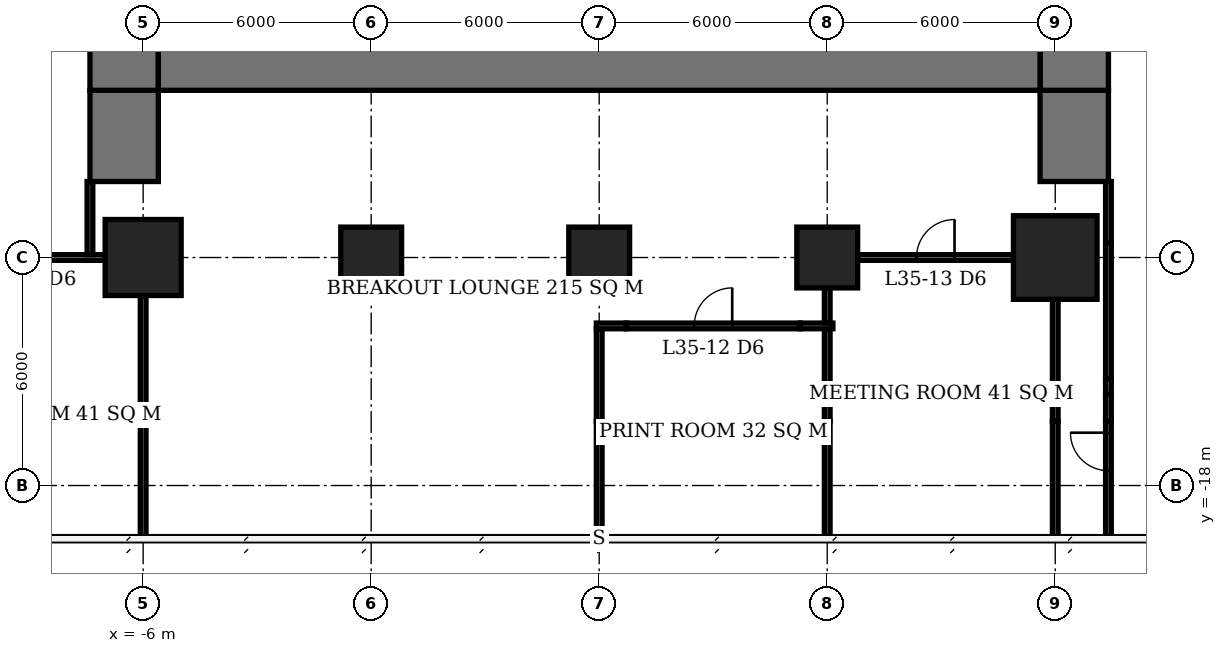
"""IFC4 building model, lengths in metres.
Left out: names, types, materials, properties, quantities, classifications, styles, units other than length and angle.
Written with IfcOpenShell. Run it as: python <this file> out.ifc"""

import sys

from ifc_helpers import new_model, si_unit, direction, frame, frame_2d, origin, origin_2d, place, context, subcontext, project, spatial, rectangle, extrude, element, fill, save


model = new_model("IFC4")
c1 = context("Model", 3, precision=1e-05, world=origin(), true_north=direction((0.0, 1.0)))
c2 = subcontext(c1, "Body", "Model", "MODEL_VIEW")
j1 = project(units=[si_unit("LENGTHUNIT", "METRE"), si_unit("PLANEANGLEUNIT", "RADIAN")], contexts=[c1])
p1 = place(None, origin())
s1 = spatial("IfcSite", under=j1, at=p1, CompositionType="ELEMENT")
p2 = place(p1, origin())
s2 = spatial("IfcBuilding", under=s1, at=p2, CompositionType="ELEMENT")
p3 = place(p2, frame((0.0, 0.0, 144.5)))
s3 = spatial("IfcBuildingStorey", under=s2, at=p3, CompositionType="ELEMENT", Elevation=144.5)
p4 = place(p3, frame((-6.0, -12.0, 0.0), z_axis=(0.0, 0.0, 1.0), x_axis=(1.0, 0.0, 0.0)))
e1 = element("IfcColumn", 1, at=p4, inside=s3, PredefinedType="COLUMN", context=c2, shape_type="SweptSolid", body=[
    extrude(rectangle(XDim=2.0, YDim=2.0, at=origin_2d()), origin(), (0.0, 0.0, 1.0), 3.9),
])
for number, where, z_axis, x_axis in (
    (2, (0.0, -12.0, 0.0), (0.0, 0.0, 1.0), (1.0, 0.0, 0.0)),
    (3, (6.0, -12.0, 0.0), (0.0, 0.0, 1.0), (1.0, 0.0, 0.0)),
    (4, (12.0, -12.0, 0.0), (0.0, 0.0, 1.0), (1.0, 0.0, 0.0)),
):
    element("IfcColumn", number, at=place(p3, frame(where, z_axis=z_axis, x_axis=x_axis)), inside=s3, PredefinedType="COLUMN", context=c2, shape_type="SweptSolid", body=[
        extrude(rectangle(XDim=1.6, YDim=1.6, at=origin_2d()), origin(), (0.0, 0.0, 1.0), 3.9),
    ])
p5 = place(p3, frame((18.0, -12.0, 0.0), z_axis=(0.0, 0.0, 1.0), x_axis=(1.0, 0.0, 0.0)))
e5 = element("IfcColumn", 5, at=p5, inside=s3, PredefinedType="COLUMN", context=c2, shape_type="SweptSolid", body=[
    extrude(rectangle(XDim=2.2, YDim=2.2, at=origin_2d()), origin(), (0.0, 0.0, 1.0), 3.9),
])
p6 = place(p3, frame((-5.6, -6.6, 0.0), z_axis=(0.0, 0.0, 1.0), x_axis=(1.0, 0.0, 0.0)))
e6 = element("IfcWall", 6, at=p6, inside=s3, PredefinedType="SHEAR", context=c2, shape_type="SweptSolid", body=[
    extrude(rectangle(XDim=23.2, YDim=2.0, at=frame_2d((11.6, 0.0))), origin(), (0.0, 0.0, 1.0), 3.9),
])
p7 = place(p3, frame((-6.5, -7.6, 0.0), z_axis=(0.0, 0.0, 1.0), x_axis=(0.0, 1.0, 0.0)))
e7 = element("IfcWall", 7, at=p7, inside=s3, PredefinedType="SHEAR", context=c2, shape_type="SweptSolid", body=[
    extrude(rectangle(XDim=21.2, YDim=1.8, at=frame_2d((10.6, 0.0))), origin(), (0.0, 0.0, 1.0), 3.9),
])
p8 = place(p7, frame((7.8, 0.0, 0.0)))
e8 = element("IfcOpeningElement", 8, at=p8, cuts=e7, PredefinedType="OPENING", context=c2, shape_type="SweptSolid", body=[
    extrude(rectangle(XDim=1.8, YDim=2.4, at=frame_2d((0.9, 1.2))), frame((0.0, 0.91, 0.0), z_axis=(0.0, -1.0, 0.0), x_axis=(1.0, 0.0, 0.0)), (0.0, 0.0, 1.0), 1.82),
])
p9 = place(p3, frame((18.5, -7.6, 0.0), z_axis=(0.0, 0.0, 1.0), x_axis=(0.0, 1.0, 0.0)))
e9 = element("IfcWall", 9, at=p9, inside=s3, PredefinedType="SHEAR", context=c2, shape_type="SweptSolid", body=[
    extrude(rectangle(XDim=21.2, YDim=1.8, at=frame_2d((10.6, 0.0))), origin(), (0.0, 0.0, 1.0), 3.9),
])
p10 = place(p9, frame((9.2, 0.0, 0.0)))
e10 = element("IfcOpeningElement", 10, at=p10, cuts=e9, PredefinedType="OPENING", context=c2, shape_type="SweptSolid", body=[
    extrude(rectangle(XDim=1.8, YDim=2.4, at=frame_2d((0.9, 1.2))), frame((0.0, 0.91, 0.0), z_axis=(0.0, -1.0, 0.0), x_axis=(1.0, 0.0, 0.0)), (0.0, 0.0, 1.0), 1.82),
])
for number, where, z_axis, x_axis in (
    (11, (-6.5, -10.0, 0.0), (0.0, 0.0, 1.0), (0.0, 1.0, 0.0)),
    (12, (18.5, -10.0, 0.0), (0.0, 0.0, 1.0), (0.0, 1.0, 0.0)),
):
    element("IfcWall", number, at=place(p3, frame(where, z_axis=z_axis, x_axis=x_axis)), inside=s3, PredefinedType="SHEAR", context=c2, shape_type="SweptSolid", body=[
        extrude(rectangle(XDim=2.4, YDim=1.8, at=frame_2d((1.2, 0.0))), origin(), (0.0, 0.0, 1.0), 3.9),
    ])
p11 = place(p3, frame((5.925, -13.8, 0.0), z_axis=(0.0, 0.0, 1.0), x_axis=(1.0, 0.0, 0.0)))
e13 = element("IfcWall", 13, at=p11, inside=s3, PredefinedType="PARTITIONING", context=c2, shape_type="SweptSolid", body=[
    extrude(rectangle(XDim=0.785, YDim=0.15, at=frame_2d((0.393, 0.0))), origin(), (0.0, 0.0, 1.0), 2.65),
])
p12 = place(p3, frame((6.71, -13.8, 0.0), z_axis=(0.0, 0.0, 1.0), x_axis=(1.0, 0.0, 0.0)))
e14 = element("IfcWall", 14, at=p12, inside=s3, PredefinedType="PARTITIONING", context=c2, shape_type="SweptSolid", body=[
    extrude(rectangle(XDim=4.58, YDim=0.15, at=frame_2d((2.29, 0.0))), origin(), (0.0, 0.0, 1.0), 3.65),
])
p13 = place(p12, frame((1.79, 0.0, 0.0)))
e15 = element("IfcOpeningElement", 15, at=p13, cuts=e14, PredefinedType="OPENING", context=c2, shape_type="SweptSolid", body=[
    extrude(rectangle(XDim=1.0, YDim=2.1, at=frame_2d((0.5, 1.05))), frame((0.0, 0.085, 0.0), z_axis=(0.0, -1.0, 0.0), x_axis=(1.0, 0.0, 0.0)), (0.0, 0.0, 1.0), 0.17),
])
p14 = place(p3, frame((11.29, -13.8, 0.0), z_axis=(0.0, 0.0, 1.0), x_axis=(1.0, 0.0, 0.0)))
e16 = element("IfcWall", 16, at=p14, inside=s3, PredefinedType="PARTITIONING", context=c2, shape_type="SweptSolid", body=[
    extrude(rectangle(XDim=0.86, YDim=0.15, at=frame_2d((0.43, 0.0))), origin(), (0.0, 0.0, 1.0), 2.65),
])
p15 = place(p3, frame((-11.2, -12.0, 0.0), z_axis=(0.0, 0.0, 1.0), x_axis=(1.0, 0.0, 0.0)))
e17 = element("IfcWall", 17, at=p15, inside=s3, PredefinedType="PARTITIONING", context=c2, shape_type="SweptSolid", body=[
    extrude(rectangle(XDim=4.2, YDim=0.15, at=frame_2d((2.1, 0.0))), origin(), (0.0, 0.0, 1.0), 3.65),
])
p16 = place(p15, frame((1.6, 0.0, 0.0)))
e18 = element("IfcOpeningElement", 18, at=p16, cuts=e17, PredefinedType="OPENING", context=c2, shape_type="SweptSolid", body=[
    extrude(rectangle(XDim=1.0, YDim=2.1, at=frame_2d((0.5, 1.05))), frame((0.0, 0.085, 0.0), z_axis=(0.0, -1.0, 0.0), x_axis=(1.0, 0.0, 0.0)), (0.0, 0.0, 1.0), 0.17),
])
p17 = place(p3, frame((12.8, -12.0, 0.0), z_axis=(0.0, 0.0, 1.0), x_axis=(1.0, 0.0, 0.0)))
e19 = element("IfcWall", 19, at=p17, inside=s3, PredefinedType="PARTITIONING", context=c2, shape_type="SweptSolid", body=[
    extrude(rectangle(XDim=4.1, YDim=0.15, at=frame_2d((2.05, 0.0))), origin(), (0.0, 0.0, 1.0), 3.65),
])
p18 = place(p17, frame((1.55, 0.0, 0.0)))
e20 = element("IfcOpeningElement", 20, at=p18, cuts=e19, PredefinedType="OPENING", context=c2, shape_type="SweptSolid", body=[
    extrude(rectangle(XDim=1.0, YDim=2.1, at=frame_2d((0.5, 1.05))), frame((0.0, 0.085, 0.0), z_axis=(0.0, -1.0, 0.0), x_axis=(1.0, 0.0, 0.0)), (0.0, 0.0, 1.0), 0.17),
])
p19 = place(p3, frame((-6.0, -19.4, 0.0), z_axis=(0.0, 0.0, 1.0), x_axis=(0.0, 1.0, 0.0)))
e21 = element("IfcWall", 21, at=p19, inside=s3, PredefinedType="PARTITIONING", context=c2, shape_type="SweptSolid", body=[
    extrude(rectangle(XDim=3.09, YDim=0.15, at=frame_2d((1.545, 0.0))), origin(), (0.0, 0.0, 1.0), 3.65),
])
p20 = place(p3, frame((-6.0, -16.31, 0.0), z_axis=(0.0, 0.0, 1.0), x_axis=(0.0, 1.0, 0.0)))
e22 = element("IfcWall", 22, at=p20, inside=s3, PredefinedType="PARTITIONING", context=c2, shape_type="SweptSolid", body=[
    extrude(rectangle(XDim=3.31, YDim=0.15, at=frame_2d((1.655, 0.0))), origin(), (0.0, 0.0, 1.0), 2.65),
])
p21 = place(p3, frame((6.0, -19.35, 0.0), z_axis=(0.0, 0.0, 1.0), x_axis=(0.0, 1.0, 0.0)))
e23 = element("IfcWall", 23, at=p21, inside=s3, PredefinedType="PARTITIONING", context=c2, shape_type="SweptSolid", body=[
    extrude(rectangle(XDim=3.04, YDim=0.15, at=frame_2d((1.52, 0.0))), origin(), (0.0, 0.0, 1.0), 3.65),
])
p22 = place(p3, frame((6.0, -16.31, 0.0), z_axis=(0.0, 0.0, 1.0), x_axis=(0.0, 1.0, 0.0)))
e24 = element("IfcWall", 24, at=p22, inside=s3, PredefinedType="PARTITIONING", context=c2, shape_type="SweptSolid", body=[
    extrude(rectangle(XDim=2.435, YDim=0.15, at=frame_2d((1.218, 0.0))), origin(), (0.0, 0.0, 1.0), 2.65),
])
p23 = place(p3, frame((12.0, -19.4, 0.0), z_axis=(0.0, 0.0, 1.0), x_axis=(0.0, 1.0, 0.0)))
e25 = element("IfcWall", 25, at=p23, inside=s3, PredefinedType="PARTITIONING", context=c2, shape_type="SweptSolid", body=[
    extrude(rectangle(XDim=3.09, YDim=0.15, at=frame_2d((1.545, 0.0))), origin(), (0.0, 0.0, 1.0), 3.65),
])
p24 = place(p3, frame((12.0, -16.31, 0.0), z_axis=(0.0, 0.0, 1.0), x_axis=(0.0, 1.0, 0.0)))
e26 = element("IfcWall", 26, at=p24, inside=s3, PredefinedType="PARTITIONING", context=c2, shape_type="SweptSolid", body=[
    extrude(rectangle(XDim=2.435, YDim=0.15, at=frame_2d((1.218, 0.0))), origin(), (0.0, 0.0, 1.0), 2.65),
])
p25 = place(p3, frame((12.0, -13.725, 0.0), z_axis=(0.0, 0.0, 1.0), x_axis=(0.0, 1.0, 0.0)))
e27 = element("IfcWall", 27, at=p25, inside=s3, PredefinedType="PARTITIONING", context=c2, shape_type="SweptSolid", body=[
    extrude(rectangle(XDim=0.925, YDim=0.15, at=frame_2d((0.462, 0.0))), origin(), (0.0, 0.0, 1.0), 2.65),
])
p26 = place(p3, frame((18.0, -19.4, 0.0), z_axis=(0.0, 0.0, 1.0), x_axis=(0.0, 1.0, 0.0)))
e28 = element("IfcWall", 28, at=p26, inside=s3, PredefinedType="PARTITIONING", context=c2, shape_type="SweptSolid", body=[
    extrude(rectangle(XDim=3.09, YDim=0.15, at=frame_2d((1.545, 0.0))), origin(), (0.0, 0.0, 1.0), 3.65),
])
p27 = place(p3, frame((18.0, -16.31, 0.0), z_axis=(0.0, 0.0, 1.0), x_axis=(0.0, 1.0, 0.0)))
e29 = element("IfcWall", 29, at=p27, inside=s3, PredefinedType="PARTITIONING", context=c2, shape_type="SweptSolid", body=[
    extrude(rectangle(XDim=3.21, YDim=0.15, at=frame_2d((1.605, 0.0))), origin(), (0.0, 0.0, 1.0), 2.65),
])
p28 = place(p3, frame((-7.4, -11.925, 0.0), z_axis=(0.0, 0.0, 1.0), x_axis=(0.0, 1.0, 0.0)))
e30 = element("IfcWall", 30, at=p28, inside=s3, PredefinedType="PARTITIONING", context=c2, shape_type="SweptSolid", body=[
    extrude(rectangle(XDim=1.925, YDim=0.15, at=frame_2d((0.962, 0.0))), origin(), (0.0, 0.0, 1.0), 3.65),
])
p29 = place(p3, frame((19.4, -19.4, 0.0), z_axis=(0.0, 0.0, 1.0), x_axis=(0.0, 1.0, 0.0)))
e31 = element("IfcWall", 31, at=p29, inside=s3, PredefinedType="PARTITIONING", context=c2, shape_type="SweptSolid", body=[
    extrude(rectangle(XDim=3.09, YDim=0.15, at=frame_2d((1.545, 0.0))), origin(), (0.0, 0.0, 1.0), 3.65),
])
p30 = place(p29, frame((1.79, 0.0, 0.0)))
e32 = element("IfcOpeningElement", 32, at=p30, cuts=e31, PredefinedType="OPENING", context=c2, shape_type="SweptSolid", body=[
    extrude(rectangle(XDim=1.0, YDim=2.1, at=frame_2d((0.5, 1.05))), frame((0.0, 0.085, 0.0), z_axis=(0.0, -1.0, 0.0), x_axis=(1.0, 0.0, 0.0)), (0.0, 0.0, 1.0), 0.17),
])
p31 = place(p3, frame((19.4, -16.31, 0.0), z_axis=(0.0, 0.0, 1.0), x_axis=(0.0, 1.0, 0.0)))
e33 = element("IfcWall", 33, at=p31, inside=s3, PredefinedType="PARTITIONING", context=c2, shape_type="SweptSolid", body=[
    extrude(rectangle(XDim=0.72, YDim=0.15, at=frame_2d((0.36, 0.0))), origin(), (0.0, 0.0, 1.0), 2.65),
])
p32 = place(p3, frame((19.4, -15.59, 0.0), z_axis=(0.0, 0.0, 1.0), x_axis=(0.0, 1.0, 0.0)))
e34 = element("IfcWall", 34, at=p32, inside=s3, PredefinedType="PARTITIONING", context=c2, shape_type="SweptSolid", body=[
    extrude(rectangle(XDim=0.398, YDim=0.15, at=frame_2d((0.199, 0.0))), origin(), (0.0, 0.0, 1.0), 3.65),
])
p33 = place(p3, frame((19.4, -15.192, 0.0), z_axis=(0.0, 0.0, 1.0), x_axis=(0.0, 1.0, 0.0)))
e35 = element("IfcWall", 35, at=p33, inside=s3, PredefinedType="PARTITIONING", context=c2, shape_type="SweptSolid", body=[
    extrude(rectangle(XDim=3.584, YDim=0.15, at=frame_2d((1.792, 0.0))), origin(), (0.0, 0.0, 1.0), 2.65),
])
p34 = place(p3, frame((19.4, -11.608, 0.0), z_axis=(0.0, 0.0, 1.0), x_axis=(0.0, 1.0, 0.0)))
e36 = element("IfcWall", 36, at=p34, inside=s3, PredefinedType="PARTITIONING", context=c2, shape_type="SweptSolid", body=[
    extrude(rectangle(XDim=1.608, YDim=0.15, at=frame_2d((0.804, 0.0))), origin(), (0.0, 0.0, 1.0), 3.65),
])
p35 = place(p13, origin())
e37 = element("IfcDoor", 37, at=p35, inside=s3, OperationType="SINGLE_SWING_RIGHT", PredefinedType="DOOR", context=c2, shape_type="SweptSolid", body=[
    extrude(rectangle(XDim=1.0, YDim=2.1, at=frame_2d((0.5, 1.05))), frame((0.0, 0.025, 0.0), z_axis=(0.0, -1.0, 0.0), x_axis=(1.0, 0.0, 0.0)), (0.0, 0.0, 1.0), 0.05),
])
fill(e15, e37)
p36 = place(p18, origin())
e38 = element("IfcDoor", 38, at=p36, inside=s3, OperationType="SINGLE_SWING_RIGHT", PredefinedType="DOOR", context=c2, shape_type="SweptSolid", body=[
    extrude(rectangle(XDim=1.0, YDim=2.1, at=frame_2d((0.5, 1.05))), frame((0.0, 0.025, 0.0), z_axis=(0.0, -1.0, 0.0), x_axis=(1.0, 0.0, 0.0)), (0.0, 0.0, 1.0), 0.05),
])
fill(e20, e38)
p37 = place(p30, origin())
e39 = element("IfcDoor", 39, at=p37, inside=s3, OperationType="SINGLE_SWING_RIGHT", PredefinedType="DOOR", context=c2, shape_type="SweptSolid", body=[
    extrude(rectangle(XDim=1.0, YDim=2.1, at=frame_2d((0.5, 1.05))), frame((0.0, 0.025, 0.0), z_axis=(0.0, -1.0, 0.0), x_axis=(1.0, 0.0, 0.0)), (0.0, 0.0, 1.0), 0.05),
])
fill(e32, e39)
save(model, sys.argv[1])
